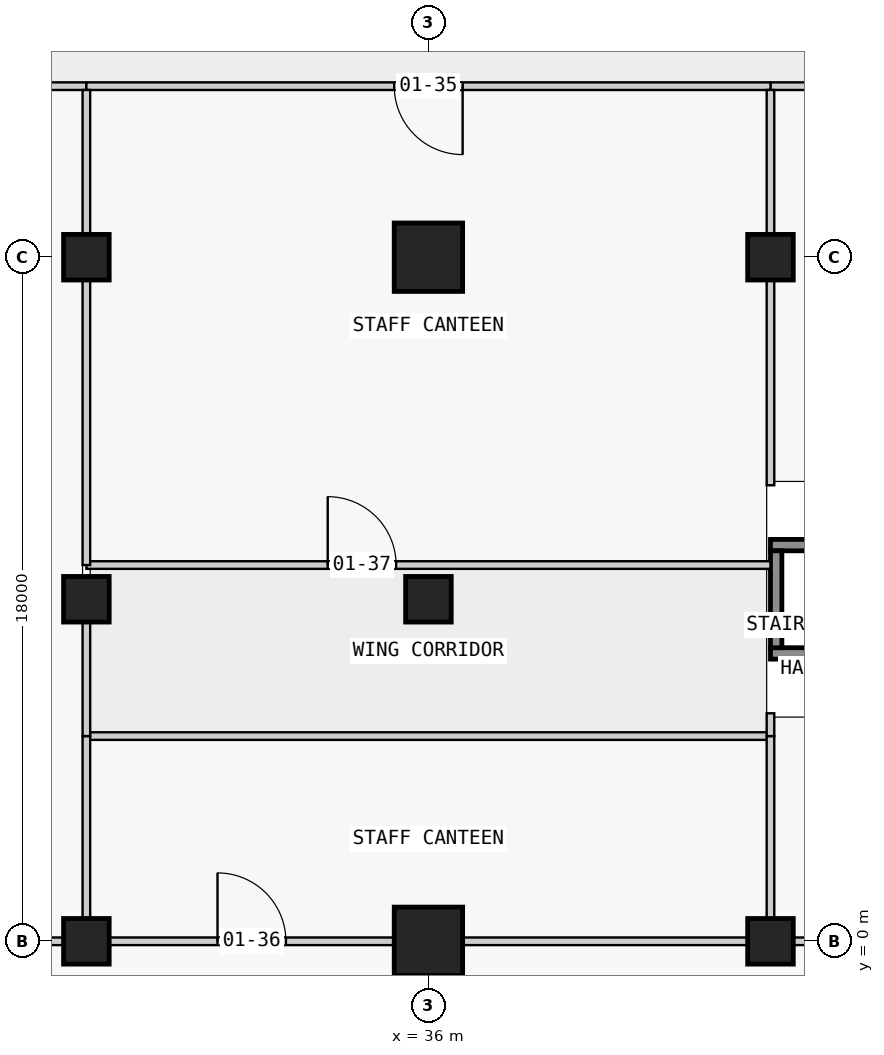
"""IFC4 building model, lengths in metres.
Left out: names, types, materials, properties, quantities, classifications, styles, units other than length and angle.
Written with IfcOpenShell. Run it as: python <this file> out.ifc"""

import sys

from ifc_helpers import new_model, si_unit, direction, frame, frame_2d, origin, origin_2d, place, context, subcontext, project, spatial, rectangle, extrude, element, fill, save


model = new_model("IFC4")
c1 = context("Model", 3, precision=1e-05, world=origin(), true_north=direction((0.0, 1.0)))
c2 = subcontext(c1, "Body", "Model", "MODEL_VIEW")
j1 = project(units=[si_unit("LENGTHUNIT", "METRE"), si_unit("PLANEANGLEUNIT", "RADIAN")], contexts=[c1])
p1 = place(None, origin())
s1 = spatial("IfcSite", under=j1, at=p1, CompositionType="ELEMENT")
p2 = place(p1, origin())
s2 = spatial("IfcBuilding", under=s1, at=p2, CompositionType="ELEMENT")
p3 = place(p2, frame((0.0, 0.0, 8.0)))
s3 = spatial("IfcBuildingStorey", under=s2, at=p3, CompositionType="ELEMENT", Elevation=8.0)
for number, where, z_axis, x_axis in (
    (1, (27.0, 0.0, 0.0), (0.0, 0.0, 1.0), (1.0, 0.0, 0.0)),
    (2, (27.0, 9.0, 0.0), (0.0, 0.0, 1.0), (1.0, 0.0, 0.0)),
    (3, (27.0, 18.0, 0.0), (0.0, 0.0, 1.0), (1.0, 0.0, 0.0)),
):
    element("IfcColumn", number, at=place(p3, frame(where, z_axis=z_axis, x_axis=x_axis)), inside=s3, PredefinedType="COLUMN", context=c2, shape_type="SweptSolid", body=[
        extrude(rectangle(XDim=1.2, YDim=1.2, at=origin_2d()), origin(), (0.0, 0.0, 1.0), 4.8),
    ])
p4 = place(p3, frame((36.0, 0.0, 0.0), z_axis=(0.0, 0.0, 1.0), x_axis=(1.0, 0.0, 0.0)))
e4 = element("IfcColumn", 4, at=p4, inside=s3, PredefinedType="COLUMN", context=c2, shape_type="SweptSolid", body=[
    extrude(rectangle(XDim=1.8, YDim=1.8, at=origin_2d()), origin(), (0.0, 0.0, 1.0), 4.8),
])
p5 = place(p3, frame((36.0, 9.0, 0.0), z_axis=(0.0, 0.0, 1.0), x_axis=(1.0, 0.0, 0.0)))
e5 = element("IfcColumn", 5, at=p5, inside=s3, PredefinedType="COLUMN", context=c2, shape_type="SweptSolid", body=[
    extrude(rectangle(XDim=1.2, YDim=1.2, at=origin_2d()), origin(), (0.0, 0.0, 1.0), 4.8),
])
p6 = place(p3, frame((36.0, 18.0, 0.0), z_axis=(0.0, 0.0, 1.0), x_axis=(1.0, 0.0, 0.0)))
e6 = element("IfcColumn", 6, at=p6, inside=s3, PredefinedType="COLUMN", context=c2, shape_type="SweptSolid", body=[
    extrude(rectangle(XDim=1.8, YDim=1.8, at=origin_2d()), origin(), (0.0, 0.0, 1.0), 4.8),
])
for number, where, z_axis, x_axis in (
    (7, (45.0, 0.0, 0.0), (0.0, 0.0, 1.0), (1.0, 0.0, 0.0)),
    (8, (45.0, 18.0, 0.0), (0.0, 0.0, 1.0), (1.0, 0.0, 0.0)),
):
    element("IfcColumn", number, at=place(p3, frame(where, z_axis=z_axis, x_axis=x_axis)), inside=s3, PredefinedType="COLUMN", context=c2, shape_type="SweptSolid", body=[
        extrude(rectangle(XDim=1.2, YDim=1.2, at=origin_2d()), origin(), (0.0, 0.0, 1.0), 4.8),
    ])
p7 = place(p3, frame((45.15, 7.725, 0.0), z_axis=(0.0, 0.0, 1.0), x_axis=(0.0, 1.0, 0.0)))
e9 = element("IfcWall", 9, at=p7, inside=s3, PredefinedType="SHEAR", context=c2, shape_type="SweptSolid", body=[
    extrude(rectangle(XDim=2.55, YDim=0.3, at=frame_2d((1.275, 0.0))), origin(), (0.0, 0.0, 1.0), 4.8),
])
for number, where, z_axis, x_axis in (
    (10, (45.0, 7.575, 0.0), (0.0, 0.0, 1.0), (1.0, 0.0, 0.0)),
    (11, (45.0, 10.425, 0.0), (0.0, 0.0, 1.0), (1.0, 0.0, 0.0)),
):
    element("IfcWall", number, at=place(p3, frame(where, z_axis=z_axis, x_axis=x_axis)), inside=s3, PredefinedType="SHEAR", context=c2, shape_type="SweptSolid", body=[
        extrude(rectangle(XDim=7.2, YDim=0.3, at=frame_2d((3.6, 0.0))), origin(), (0.0, 0.0, 1.0), 4.8),
    ])
p8 = place(p3, frame((45.6, 0.0, 0.0), z_axis=(0.0, 0.0, 1.0), x_axis=(1.0, 0.0, 0.0)))
e12 = element("IfcWall", 12, at=p8, inside=s3, PredefinedType="PARTITIONING", context=c2, shape_type="SweptSolid", body=[
    extrude(rectangle(XDim=7.5, YDim=0.2, at=frame_2d((3.75, 0.0))), origin(), (0.0, 0.0, 1.0), 3.75),
])
p9 = place(p8, frame((2.85, 0.0, 0.0)))
e13 = element("IfcOpeningElement", 13, at=p9, cuts=e12, PredefinedType="OPENING", context=c2, shape_type="SweptSolid", body=[
    extrude(rectangle(XDim=1.8, YDim=2.1, at=frame_2d((0.9, 1.05))), frame((0.0, 0.11, 0.0), z_axis=(0.0, -1.0, 0.0), x_axis=(1.0, 0.0, 0.0)), (0.0, 0.0, 1.0), 0.22),
])
p10 = place(p3, frame((72.0, 22.5, 0.0), z_axis=(0.0, 0.0, 1.0), x_axis=(-1.0, 0.0, 0.0)))
e14 = element("IfcWall", 14, at=p10, inside=s3, PredefinedType="PARTITIONING", context=c2, shape_type="SweptSolid", body=[
    extrude(rectangle(XDim=27.0, YDim=0.2, at=frame_2d((13.5, 0.0))), origin(), (0.0, 0.0, 1.0), 3.75),
])
p11 = place(p10, frame((12.6, 0.0, 0.0)))
e15 = element("IfcOpeningElement", 15, at=p11, cuts=e14, PredefinedType="OPENING", context=c2, shape_type="SweptSolid", body=[
    extrude(rectangle(XDim=1.8, YDim=2.1, at=frame_2d((0.9, 1.05))), frame((0.0, 0.11, 0.0), z_axis=(0.0, -1.0, 0.0), x_axis=(1.0, 0.0, 0.0)), (0.0, 0.0, 1.0), 0.22),
])
p12 = place(p3, frame((22.5, 22.5, 0.0), z_axis=(0.0, 0.0, 1.0), x_axis=(1.0, 0.0, 0.0)))
e16 = element("IfcWall", 16, at=p12, inside=s3, PredefinedType="PARTITIONING", context=c2, shape_type="SweptSolid", body=[
    extrude(rectangle(XDim=4.5, YDim=0.2, at=frame_2d((2.25, 0.0))), origin(), (0.0, 0.0, 1.0), 3.75),
])
p13 = place(p3, frame((45.0, 22.5, 0.0), z_axis=(0.0, 0.0, 1.0), x_axis=(-1.0, 0.0, 0.0)))
e17 = element("IfcWall", 17, at=p13, inside=s3, PredefinedType="PARTITIONING", context=c2, shape_type="SweptSolid", body=[
    extrude(rectangle(XDim=18.0, YDim=0.2, at=frame_2d((9.0, 0.0))), origin(), (0.0, 0.0, 1.0), 3.75),
])
p14 = place(p13, frame((8.1, 0.0, 0.0)))
e18 = element("IfcOpeningElement", 18, at=p14, cuts=e17, PredefinedType="OPENING", context=c2, shape_type="SweptSolid", body=[
    extrude(rectangle(XDim=1.8, YDim=2.1, at=frame_2d((0.9, 1.05))), frame((0.0, 0.11, 0.0), z_axis=(0.0, -1.0, 0.0), x_axis=(1.0, 0.0, 0.0)), (0.0, 0.0, 1.0), 0.22),
])
p15 = place(p3, frame((27.6, 0.0, 0.0), z_axis=(0.0, 0.0, 1.0), x_axis=(1.0, 0.0, 0.0)))
e19 = element("IfcWall", 19, at=p15, inside=s3, PredefinedType="PARTITIONING", context=c2, shape_type="SweptSolid", body=[
    extrude(rectangle(XDim=7.5, YDim=0.2, at=frame_2d((3.75, 0.0))), origin(), (0.0, 0.0, 1.0), 3.75),
])
p16 = place(p15, frame((2.85, 0.0, 0.0)))
e20 = element("IfcOpeningElement", 20, at=p16, cuts=e19, PredefinedType="OPENING", context=c2, shape_type="SweptSolid", body=[
    extrude(rectangle(XDim=1.8, YDim=2.1, at=frame_2d((0.9, 1.05))), frame((0.0, 0.11, 0.0), z_axis=(0.0, -1.0, 0.0), x_axis=(1.0, 0.0, 0.0)), (0.0, 0.0, 1.0), 0.22),
])
p17 = place(p3, frame((36.9, 0.0, 0.0), z_axis=(0.0, 0.0, 1.0), x_axis=(1.0, 0.0, 0.0)))
e21 = element("IfcWall", 21, at=p17, inside=s3, PredefinedType="PARTITIONING", context=c2, shape_type="SweptSolid", body=[
    extrude(rectangle(XDim=7.5, YDim=0.2, at=frame_2d((3.75, 0.0))), origin(), (0.0, 0.0, 1.0), 3.75),
])
p18 = place(p3, frame((27.0, 9.9, 0.0), z_axis=(0.0, 0.0, 1.0), x_axis=(1.0, 0.0, 0.0)))
e22 = element("IfcWall", 22, at=p18, inside=s3, PredefinedType="PARTITIONING", context=c2, shape_type="SweptSolid", body=[
    extrude(rectangle(XDim=18.0, YDim=0.2, at=frame_2d((9.0, 0.0))), origin(), (0.0, 0.0, 1.0), 3.75),
])
p19 = place(p18, frame((6.35, 0.0, 0.0)))
e23 = element("IfcOpeningElement", 23, at=p19, cuts=e22, PredefinedType="OPENING", context=c2, shape_type="SweptSolid", body=[
    extrude(rectangle(XDim=1.8, YDim=2.1, at=frame_2d((0.9, 1.05))), frame((0.0, 0.11, 0.0), z_axis=(0.0, -1.0, 0.0), x_axis=(1.0, 0.0, 0.0)), (0.0, 0.0, 1.0), 0.22),
])
p20 = place(p3, frame((45.0, 5.4, 0.0), z_axis=(0.0, 0.0, 1.0), x_axis=(-1.0, 0.0, 0.0)))
e24 = element("IfcWall", 24, at=p20, inside=s3, PredefinedType="PARTITIONING", context=c2, shape_type="SweptSolid", body=[
    extrude(rectangle(XDim=18.0, YDim=0.2, at=frame_2d((9.0, 0.0))), origin(), (0.0, 0.0, 1.0), 3.75),
])
p21 = place(p3, frame((27.0, 22.4, 0.0), z_axis=(0.0, 0.0, 1.0), x_axis=(0.0, -1.0, 0.0)))
e25 = element("IfcWall", 25, at=p21, inside=s3, PredefinedType="PARTITIONING", context=c2, shape_type="SweptSolid", body=[
    extrude(rectangle(XDim=3.8, YDim=0.2, at=frame_2d((1.9, 0.0))), origin(), (0.0, 0.0, 1.0), 3.75),
])
p22 = place(p3, frame((27.0, 17.4, 0.0), z_axis=(0.0, 0.0, 1.0), x_axis=(0.0, -1.0, 0.0)))
e26 = element("IfcWall", 26, at=p22, inside=s3, PredefinedType="PARTITIONING", context=c2, shape_type="SweptSolid", body=[
    extrude(rectangle(XDim=7.5, YDim=0.2, at=frame_2d((3.75, 0.0))), origin(), (0.0, 0.0, 1.0), 3.75),
])
p23 = place(p3, frame((45.0, 22.4, 0.0), z_axis=(0.0, 0.0, 1.0), x_axis=(0.0, -1.0, 0.0)))
e27 = element("IfcWall", 27, at=p23, inside=s3, PredefinedType="PARTITIONING", context=c2, shape_type="SweptSolid", body=[
    extrude(rectangle(XDim=3.8, YDim=0.2, at=frame_2d((1.9, 0.0))), origin(), (0.0, 0.0, 1.0), 3.75),
])
p24 = place(p3, frame((45.0, 17.4, 0.0), z_axis=(0.0, 0.0, 1.0), x_axis=(0.0, -1.0, 0.0)))
e28 = element("IfcWall", 28, at=p24, inside=s3, PredefinedType="PARTITIONING", context=c2, shape_type="SweptSolid", body=[
    extrude(rectangle(XDim=5.4, YDim=0.2, at=frame_2d((2.7, 0.0))), origin(), (0.0, 0.0, 1.0), 4.45),
])
p25 = place(p3, frame((27.0, 5.4, 0.0), z_axis=(0.0, 0.0, 1.0), x_axis=(0.0, -1.0, 0.0)))
e29 = element("IfcWall", 29, at=p25, inside=s3, PredefinedType="PARTITIONING", context=c2, shape_type="SweptSolid", body=[
    extrude(rectangle(XDim=4.8, YDim=0.2, at=frame_2d((2.4, 0.0))), origin(), (0.0, 0.0, 1.0), 3.75),
])
p26 = place(p3, frame((45.0, 5.4, 0.0), z_axis=(0.0, 0.0, 1.0), x_axis=(0.0, -1.0, 0.0)))
e30 = element("IfcWall", 30, at=p26, inside=s3, PredefinedType="PARTITIONING", context=c2, shape_type="SweptSolid", body=[
    extrude(rectangle(XDim=4.8, YDim=0.2, at=frame_2d((2.4, 0.0))), origin(), (0.0, 0.0, 1.0), 4.45),
])
p27 = place(p3, frame((27.0, 8.4, 0.0), z_axis=(0.0, 0.0, 1.0), x_axis=(0.0, -1.0, 0.0)))
e31 = element("IfcWall", 31, at=p27, inside=s3, PredefinedType="PARTITIONING", context=c2, shape_type="SweptSolid", body=[
    extrude(rectangle(XDim=3.0, YDim=0.2, at=frame_2d((1.5, 0.0))), origin(), (0.0, 0.0, 1.0), 3.75),
])
p28 = place(p3, frame((26.4, 0.0, 0.0), z_axis=(0.0, 0.0, 1.0), x_axis=(-1.0, 0.0, 0.0)))
e32 = element("IfcWall", 32, at=p28, inside=s3, PredefinedType="PARTITIONING", context=c2, shape_type="SweptSolid", body=[
    extrude(rectangle(XDim=3.9, YDim=0.2, at=frame_2d((1.95, 0.0))), origin(), (0.0, 0.0, 1.0), 4.45),
])
p29 = place(p3, frame((45.0, 6.0, 0.0), z_axis=(0.0, 0.0, 1.0), x_axis=(0.0, -1.0, 0.0)))
e33 = element("IfcWall", 33, at=p29, inside=s3, PredefinedType="PARTITIONING", context=c2, shape_type="SweptSolid", body=[
    extrude(rectangle(XDim=0.6, YDim=0.2, at=frame_2d((0.3, 0.0))), origin(), (0.0, 0.0, 1.0), 4.45),
])
p30 = place(p14, origin())
e34 = element("IfcDoor", 34, at=p30, inside=s3, OperationType="DOUBLE_DOOR_SINGLE_SWING", PredefinedType="DOOR", context=c2, shape_type="SweptSolid", body=[
    extrude(rectangle(XDim=1.8, YDim=2.1, at=frame_2d((0.9, 1.05))), frame((0.0, 0.025, 0.0), z_axis=(0.0, -1.0, 0.0), x_axis=(1.0, 0.0, 0.0)), (0.0, 0.0, 1.0), 0.05),
])
fill(e18, e34)
p31 = place(p16, origin())
e35 = element("IfcDoor", 35, at=p31, inside=s3, OperationType="DOUBLE_DOOR_SINGLE_SWING", PredefinedType="DOOR", context=c2, shape_type="SweptSolid", body=[
    extrude(rectangle(XDim=1.8, YDim=2.1, at=frame_2d((0.9, 1.05))), frame((0.0, 0.025, 0.0), z_axis=(0.0, -1.0, 0.0), x_axis=(1.0, 0.0, 0.0)), (0.0, 0.0, 1.0), 0.05),
])
fill(e20, e35)
p32 = place(p19, origin())
e36 = element("IfcDoor", 36, at=p32, inside=s3, OperationType="DOUBLE_DOOR_SINGLE_SWING", PredefinedType="DOOR", context=c2, shape_type="SweptSolid", body=[
    extrude(rectangle(XDim=1.8, YDim=2.1, at=frame_2d((0.9, 1.05))), frame((0.0, 0.025, 0.0), z_axis=(0.0, -1.0, 0.0), x_axis=(1.0, 0.0, 0.0)), (0.0, 0.0, 1.0), 0.05),
])
fill(e23, e36)
save(model, sys.argv[1])
